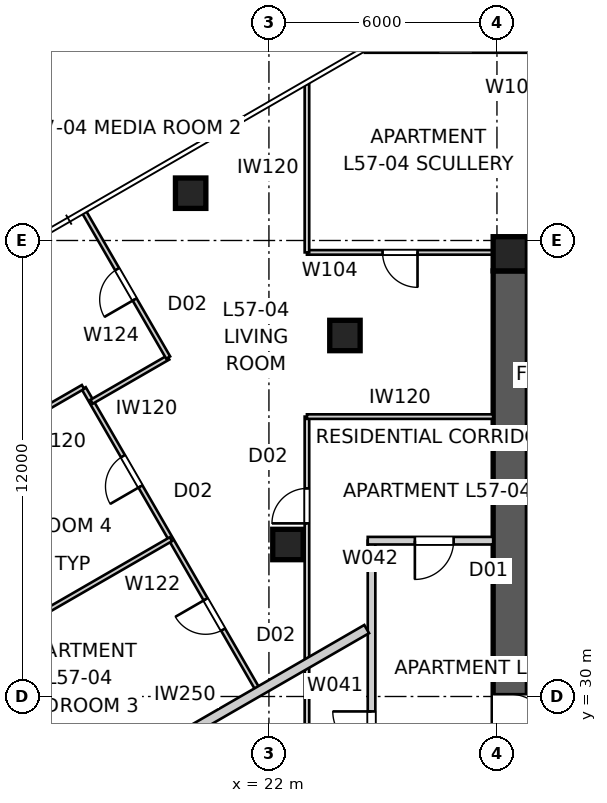
"""IFC4 building model, lengths in metres.
Left out: names, types, materials, properties, quantities, classifications, styles, units other than length and angle.
Written with IfcOpenShell. Run it as: python <this file> out.ifc"""

import sys

from ifc_helpers import new_model, si_unit, direction, frame, frame_2d, origin, origin_2d, place, context, subcontext, project, spatial, polyline, rectangle, outline, extrude, element, fill, save


model = new_model("IFC4")
c1 = context("Model", 3, precision=1e-05, world=origin(), true_north=direction((0.0, 1.0)))
c2 = subcontext(c1, "Body", "Model", "MODEL_VIEW")
j1 = project(units=[si_unit("LENGTHUNIT", "METRE"), si_unit("PLANEANGLEUNIT", "RADIAN")], contexts=[c1])
p1 = place(None, origin())
s1 = spatial("IfcSite", under=j1, at=p1, CompositionType="ELEMENT")
p2 = place(p1, origin())
s2 = spatial("IfcBuilding", under=s1, at=p2, CompositionType="ELEMENT")
p3 = place(p2, frame((0.0, 0.0, 208.2)))
s3 = spatial("IfcBuildingStorey", under=s2, at=p3, CompositionType="ELEMENT", Elevation=208.2)
p4 = place(p3, frame((28.8, 41.65, 0.0), z_axis=(0.0, 0.0, 1.0), x_axis=(1.0, 0.0, 0.0)))
e1 = element("IfcWall", 1, at=p4, inside=s3, PredefinedType="SHEAR", context=c2, shape_type="SweptSolid", body=[
    extrude(outline(polyline([(0.0, -0.45), (22.4, -0.45), (22.4, -0.025), (22.85, -0.025), (22.85, 0.025), (22.4, 0.025), (22.4, 0.45), (0.0, 0.45), (0.0, 0.025), (-0.45, 0.025), (-0.45, -0.025), (0.0, -0.025), (0.0, -0.45)])), origin(), (0.0, 0.0, 1.0), 3.4),
])
p5 = place(p3, frame((28.35, 41.2, 0.0), z_axis=(0.0, 0.0, 1.0), x_axis=(0.0, -1.0, 0.0)))
e2 = element("IfcWall", 2, at=p5, inside=s3, PredefinedType="SHEAR", context=c2, shape_type="SweptSolid", body=[
    extrude(outline(polyline([(0.0, -0.45), (22.4, -0.45), (22.4, -0.025), (22.85, -0.025), (22.85, 0.025), (22.4, 0.025), (22.4, 0.45), (0.0, 0.45), (0.0, 0.025), (-0.45, 0.025), (-0.45, -0.025), (0.0, -0.025), (0.0, -0.45)])), origin(), (0.0, 0.0, 1.0), 3.4),
])
p6 = place(p5, frame((11.14, 0.0, 0.0)))
e3 = element("IfcOpeningElement", 3, at=p6, cuts=e2, PredefinedType="OPENING", context=c2, shape_type="SweptSolid", body=[
    extrude(rectangle(XDim=1.02, YDim=2.4, at=frame_2d((0.51, 1.2))), frame((0.0, 0.46, 0.0), z_axis=(0.0, -1.0, 0.0), x_axis=(1.0, 0.0, 0.0)), (0.0, 0.0, 1.0), 0.92),
])
p7 = place(p3, frame((28.35, 41.65, 0.0), z_axis=(0.0, 0.0, 1.0), x_axis=(1.0, 0.0, 0.0)))
e4 = element("IfcColumn", 4, at=p7, inside=s3, PredefinedType="COLUMN", context=c2, shape_type="SweptSolid", body=[
    extrude(rectangle(XDim=0.9, YDim=0.9, at=origin_2d()), origin(), (0.0, 0.0, 1.0), 3.4),
])
p8 = place(p3, frame((19.94, 43.245, -0.15), z_axis=(0.0, 0.0, 1.0), x_axis=(1.0, 0.0, 0.0)))
e5 = element("IfcColumn", 5, at=p8, inside=s3, PredefinedType="COLUMN", context=c2, shape_type="SweptSolid", body=[
    extrude(rectangle(XDim=0.8, YDim=0.8, at=origin_2d()), origin(), (0.0, 0.0, 1.0), 3.55),
])
for number, where, z_axis, x_axis in (
    (6, (24.0, 39.5, 0.0), (0.0, 0.0, 1.0), (1.0, 0.0, 0.0)),
    (7, (22.5, 34.0, 0.0), (0.0, 0.0, 1.0), (1.0, 0.0, 0.0)),
):
    element("IfcColumn", number, at=place(p3, frame(where, z_axis=z_axis, x_axis=x_axis)), inside=s3, PredefinedType="COLUMN", context=c2, shape_type="SweptSolid", body=[
        extrude(rectangle(XDim=0.8, YDim=0.8, at=origin_2d()), origin(), (0.0, 0.0, 1.0), 3.4),
    ])
p9 = place(p3, frame((24.7, 25.9, 0.0), z_axis=(0.0, 0.0, 1.0), x_axis=(0.0, 1.0, 0.0)))
e8 = element("IfcWall", 8, at=p9, inside=s3, PredefinedType="PARTITIONING", context=c2, shape_type="SweptSolid", body=[
    extrude(rectangle(XDim=8.2, YDim=0.2, at=frame_2d((4.1, 0.0))), origin(), (0.0, 0.0, 1.0), 3.25),
])
p10 = place(p9, frame((2.687, 0.0, 0.0)))
e9 = element("IfcOpeningElement", 9, at=p10, cuts=e8, PredefinedType="OPENING", context=c2, shape_type="SweptSolid", body=[
    extrude(rectangle(XDim=1.02, YDim=2.34, at=frame_2d((0.51, 1.17))), frame((0.0, 0.11, 0.0), z_axis=(0.0, -1.0, 0.0), x_axis=(1.0, 0.0, 0.0)), (0.0, 0.0, 1.0), 0.22),
])
p11 = place(p3, frame((27.9, 34.1, 0.0), z_axis=(0.0, 0.0, 1.0), x_axis=(-1.0, 0.0, 0.0)))
e10 = element("IfcWall", 10, at=p11, inside=s3, PredefinedType="PARTITIONING", context=c2, shape_type="SweptSolid", body=[
    extrude(rectangle(XDim=3.3, YDim=0.2, at=frame_2d((1.65, 0.0))), origin(), (0.0, 0.0, 1.0), 3.25),
])
p12 = place(p11, frame((1.04, 0.0, 0.0)))
e11 = element("IfcOpeningElement", 11, at=p12, cuts=e10, PredefinedType="OPENING", context=c2, shape_type="SweptSolid", body=[
    extrude(rectangle(XDim=1.02, YDim=2.34, at=frame_2d((0.51, 1.17))), frame((0.0, 0.11, 0.0), z_axis=(0.0, -1.0, 0.0), x_axis=(1.0, 0.0, 0.0)), (0.0, 0.0, 1.0), 0.22),
])
p13 = place(p3, frame((15.889, 26.761, 0.0), z_axis=(0.0, 0.0, 1.0), x_axis=(0.866024190901, 0.50000210077, 0.0)))
e12 = element("IfcWall", 12, at=p13, inside=s3, PredefinedType="PARTITIONING", context=c2, shape_type="SweptSolid", body=[
    extrude(rectangle(XDim=10.026, YDim=0.25, at=frame_2d((5.013, 0.0))), origin(), (0.0, 0.0, 1.0), 3.25),
])
p14 = place(p3, frame((23.0, 20.185, 0.0), z_axis=(0.0, 0.0, 1.0), x_axis=(0.0, 1.0, 0.0)))
e13 = element("IfcWall", 13, at=p14, inside=s3, PredefinedType="PARTITIONING", context=c2, shape_type="SweptSolid", body=[
    extrude(rectangle(XDim=17.18, YDim=0.12, at=frame_2d((8.59, 0.0))), origin(), (0.0, 0.0, 1.0), 2.55),
])
p15 = place(p14, frame((7.688, 0.0, 0.0)))
e14 = element("IfcOpeningElement", 14, at=p15, cuts=e13, PredefinedType="OPENING", context=c2, shape_type="SweptSolid", body=[
    extrude(rectangle(XDim=0.92, YDim=2.34, at=frame_2d((0.46, 1.17))), frame((0.0, 0.07, 0.0), z_axis=(0.0, -1.0, 0.0), x_axis=(1.0, 0.0, 0.0)), (0.0, 0.0, 1.0), 0.14),
])
p16 = place(p14, frame((14.371, 0.0, 0.0)))
e15 = element("IfcOpeningElement", 15, at=p16, cuts=e13, PredefinedType="OPENING", context=c2, shape_type="SweptSolid", body=[
    extrude(rectangle(XDim=0.92, YDim=2.34, at=frame_2d((0.46, 1.17))), frame((0.0, 0.07, 0.0), z_axis=(0.0, -1.0, 0.0), x_axis=(1.0, 0.0, 0.0)), (0.0, 0.0, 1.0), 0.14),
])
p17 = place(p3, frame((23.0, 37.365, 0.0), z_axis=(0.0, 0.0, 1.0), x_axis=(1.0, 0.0, 0.0)))
e16 = element("IfcWall", 16, at=p17, inside=s3, PredefinedType="PARTITIONING", context=c2, shape_type="SweptSolid", body=[
    extrude(rectangle(XDim=4.9, YDim=0.12, at=frame_2d((2.45, 0.0))), origin(), (0.0, 0.0, 1.0), 3.25),
])
p18 = place(p3, frame((27.9, 41.687, 0.0), z_axis=(0.0, 0.0, 1.0), x_axis=(-1.0, 0.0, 0.0)))
e17 = element("IfcWall", 17, at=p18, inside=s3, PredefinedType="PARTITIONING", context=c2, shape_type="SweptSolid", body=[
    extrude(rectangle(XDim=4.9, YDim=0.12, at=frame_2d((2.45, 0.0))), origin(), (0.0, 0.0, 1.0), 3.25),
])
p19 = place(p18, frame((1.99, 0.0, 0.0)))
e18 = element("IfcOpeningElement", 18, at=p19, cuts=e17, PredefinedType="OPENING", context=c2, shape_type="SweptSolid", body=[
    extrude(rectangle(XDim=0.92, YDim=2.1, at=frame_2d((0.46, 1.05))), frame((0.0, 0.07, 0.0), z_axis=(0.0, -1.0, 0.0), x_axis=(1.0, 0.0, 0.0)), (0.0, 0.0, 1.0), 0.14),
])
p20 = place(p3, frame((23.0, 41.687, 0.0), z_axis=(0.0, 0.0, 1.0), x_axis=(0.0, 1.0, 0.0)))
e19 = element("IfcWall", 19, at=p20, inside=s3, PredefinedType="PARTITIONING", context=c2, shape_type="SweptSolid", body=[
    extrude(rectangle(XDim=4.433, YDim=0.12, at=frame_2d((2.216, 0.0))), origin(), (0.0, 0.0, 1.0), 3.25),
])
p21 = place(p3, frame((24.525, 47.0, 0.0), z_axis=(0.0, 0.0, 1.0), x_axis=(1.0, 0.0, 0.0)))
e20 = element("IfcWall", 20, at=p21, inside=s3, PredefinedType="PARTITIONING", context=c2, shape_type="SweptSolid", body=[
    extrude(rectangle(XDim=15.879, YDim=0.12, at=frame_2d((7.939, 0.0))), origin(), (0.0, 0.0, 1.0), 2.55),
])
p22 = place(p21, frame((1.928, 0.0, 0.0)))
e21 = element("IfcOpeningElement", 21, at=p22, cuts=e20, PredefinedType="OPENING", context=c2, shape_type="SweptSolid", body=[
    extrude(rectangle(XDim=0.92, YDim=2.1, at=frame_2d((0.46, 1.05))), frame((0.0, 0.07, 0.0), z_axis=(0.0, -1.0, 0.0), x_axis=(1.0, 0.0, 0.0)), (0.0, 0.0, 1.0), 0.14),
])
p23 = place(p3, frame((21.733, 30.134, 0.0), z_axis=(0.0, 0.0, 1.0), x_axis=(-0.500019218905, 0.86601430746, 0.0)))
e22 = element("IfcWall", 22, at=p23, inside=s3, PredefinedType="PARTITIONING", context=c2, shape_type="SweptSolid", body=[
    extrude(rectangle(XDim=9.21, YDim=0.12, at=frame_2d((4.605, 0.0))), origin(), (0.0, 0.0, 1.0), 3.25),
])
p24 = place(p23, frame((1.877, 0.0, 0.0)))
e23 = element("IfcOpeningElement", 23, at=p24, cuts=e22, PredefinedType="OPENING", context=c2, shape_type="SweptSolid", body=[
    extrude(rectangle(XDim=0.92, YDim=2.34, at=frame_2d((0.46, 1.17))), frame((0.0, 0.07, 0.0), z_axis=(0.0, -1.0, 0.0), x_axis=(1.0, 0.0, 0.0)), (0.0, 0.0, 1.0), 0.14),
])
p25 = place(p23, frame((6.228, 0.0, 0.0)))
e24 = element("IfcOpeningElement", 24, at=p25, cuts=e22, PredefinedType="OPENING", context=c2, shape_type="SweptSolid", body=[
    extrude(rectangle(XDim=0.92, YDim=2.34, at=frame_2d((0.46, 1.17))), frame((0.0, 0.07, 0.0), z_axis=(0.0, -1.0, 0.0), x_axis=(1.0, 0.0, 0.0)), (0.0, 0.0, 1.0), 0.14),
])
p26 = place(p3, frame((17.333, 37.755, 0.0), z_axis=(0.0, 0.0, 1.0), x_axis=(0.866059848015, 0.499940336097, 0.0)))
e25 = element("IfcWall", 25, at=p26, inside=s3, PredefinedType="PARTITIONING", context=c2, shape_type="SweptSolid", body=[
    extrude(rectangle(XDim=2.328, YDim=0.12, at=frame_2d((1.164, 0.0))), origin(), (0.0, 0.0, 1.0), 3.25),
])
p27 = place(p3, frame((19.349, 38.919, 0.0), z_axis=(0.0, 0.0, 1.0), x_axis=(-0.499997192861, 0.866027024481, 0.0)))
e26 = element("IfcWall", 26, at=p27, inside=s3, PredefinedType="PARTITIONING", context=c2, shape_type="SweptSolid", body=[
    extrude(rectangle(XDim=4.41, YDim=0.12, at=frame_2d((2.205, 0.0))), origin(), (0.0, 0.0, 1.0), 3.25),
])
p28 = place(p27, frame((1.765, 0.0, 0.0)))
e27 = element("IfcOpeningElement", 27, at=p28, cuts=e26, PredefinedType="OPENING", context=c2, shape_type="SweptSolid", body=[
    extrude(rectangle(XDim=0.92, YDim=2.34, at=frame_2d((0.46, 1.17))), frame((0.0, 0.07, 0.0), z_axis=(0.0, -1.0, 0.0), x_axis=(1.0, 0.0, 0.0)), (0.0, 0.0, 1.0), 0.14),
])
p29 = place(p3, frame((13.612, 30.786, 0.0), z_axis=(0.0, 0.0, 1.0), x_axis=(0.866030409726, 0.499991329354, 0.0)))
e28 = element("IfcWall", 28, at=p29, inside=s3, PredefinedType="PARTITIONING", context=c2, shape_type="SweptSolid", body=[
    extrude(rectangle(XDim=6.707, YDim=0.12, at=frame_2d((3.354, 0.0))), origin(), (0.0, 0.0, 1.0), 3.25),
])
p30 = place(p3, frame((14.763, 36.792, 0.0), z_axis=(0.0, 0.0, 1.0), x_axis=(0.86601436245, 0.500019123664, 0.0)))
e29 = element("IfcWall", 29, at=p30, inside=s3, PredefinedType="PARTITIONING", context=c2, shape_type="SweptSolid", body=[
    extrude(rectangle(XDim=2.707, YDim=0.12, at=frame_2d((1.354, 0.0))), origin(), (0.0, 0.0, 1.0), 3.25),
])
p31 = place(p3, frame((27.9, 41.687, 0.0), z_axis=(0.0, 0.0, 1.0), x_axis=(0.999162409553, -0.040920402453, 0.0)))
e30 = element("IfcWall", 30, at=p31, inside=s3, PredefinedType="PARTITIONING", context=c2, shape_type="SweptSolid", body=[
    extrude(rectangle(XDim=0.901, YDim=0.12, at=frame_2d((0.45, 0.0))), origin(), (0.0, 0.0, 1.0), 3.25),
])
p32 = place(p10, origin())
e31 = element("IfcDoor", 31, at=p32, inside=s3, OperationType="SINGLE_SWING_RIGHT", PredefinedType="DOOR", context=c2, shape_type="SweptSolid", body=[
    extrude(rectangle(XDim=1.02, YDim=2.34, at=frame_2d((0.51, 1.17))), frame((0.0, 0.025, 0.0), z_axis=(0.0, -1.0, 0.0), x_axis=(1.0, 0.0, 0.0)), (0.0, 0.0, 1.0), 0.05),
])
fill(e9, e31)
p33 = place(p12, origin())
e32 = element("IfcDoor", 32, at=p33, inside=s3, OperationType="SINGLE_SWING_RIGHT", PredefinedType="DOOR", context=c2, shape_type="SweptSolid", body=[
    extrude(rectangle(XDim=1.02, YDim=2.34, at=frame_2d((0.51, 1.17))), frame((0.0, 0.025, 0.0), z_axis=(0.0, -1.0, 0.0), x_axis=(1.0, 0.0, 0.0)), (0.0, 0.0, 1.0), 0.05),
])
fill(e11, e32)
p34 = place(p16, origin())
e33 = element("IfcDoor", 33, at=p34, inside=s3, OperationType="SINGLE_SWING_LEFT", PredefinedType="DOOR", context=c2, shape_type="SweptSolid", body=[
    extrude(rectangle(XDim=0.92, YDim=2.34, at=frame_2d((0.46, 1.17))), frame((0.0, 0.025, 0.0), z_axis=(0.0, -1.0, 0.0), x_axis=(1.0, 0.0, 0.0)), (0.0, 0.0, 1.0), 0.05),
])
fill(e15, e33)
p35 = place(p19, origin())
e34 = element("IfcDoor", 34, at=p35, inside=s3, OperationType="SINGLE_SWING_LEFT", PredefinedType="DOOR", context=c2, shape_type="SweptSolid", body=[
    extrude(rectangle(XDim=0.92, YDim=2.1, at=frame_2d((0.46, 1.05))), frame((0.0, 0.025, 0.0), z_axis=(0.0, -1.0, 0.0), x_axis=(1.0, 0.0, 0.0)), (0.0, 0.0, 1.0), 0.05),
])
fill(e18, e34)
p36 = place(p24, origin())
e35 = element("IfcDoor", 35, at=p36, inside=s3, OperationType="SINGLE_SWING_RIGHT", PredefinedType="DOOR", context=c2, shape_type="SweptSolid", body=[
    extrude(rectangle(XDim=0.92, YDim=2.34, at=frame_2d((0.46, 1.17))), frame((0.0, 0.025, 0.0), z_axis=(0.0, -1.0, 0.0), x_axis=(1.0, 0.0, 0.0)), (0.0, 0.0, 1.0), 0.05),
])
fill(e23, e35)
p37 = place(p28, origin())
e36 = element("IfcDoor", 36, at=p37, inside=s3, OperationType="SINGLE_SWING_LEFT", PredefinedType="DOOR", context=c2, shape_type="SweptSolid", body=[
    extrude(rectangle(XDim=0.92, YDim=2.34, at=frame_2d((0.46, 1.17))), frame((0.0, 0.025, 0.0), z_axis=(0.0, -1.0, 0.0), x_axis=(1.0, 0.0, 0.0)), (0.0, 0.0, 1.0), 0.05),
])
fill(e27, e36)
p38 = place(p25, origin())
e37 = element("IfcDoor", 37, at=p38, inside=s3, OperationType="SINGLE_SWING_LEFT", PredefinedType="DOOR", context=c2, shape_type="SweptSolid", body=[
    extrude(rectangle(XDim=0.92, YDim=2.34, at=frame_2d((0.46, 1.17))), frame((0.0, 0.025, 0.0), z_axis=(0.0, -1.0, 0.0), x_axis=(1.0, 0.0, 0.0)), (0.0, 0.0, 1.0), 0.05),
])
fill(e24, e37)
p39 = place(p6, origin())
e38 = element("IfcDoor", 38, at=p39, inside=s3, OperationType="SINGLE_SWING_RIGHT", PredefinedType="DOOR", context=c2, shape_type="SweptSolid", body=[
    extrude(rectangle(XDim=1.02, YDim=2.4, at=frame_2d((0.51, 1.2))), frame((0.0, 0.025, 0.0), z_axis=(0.0, -1.0, 0.0), x_axis=(1.0, 0.0, 0.0)), (0.0, 0.0, 1.0), 0.05),
])
fill(e3, e38)
save(model, sys.argv[1])
